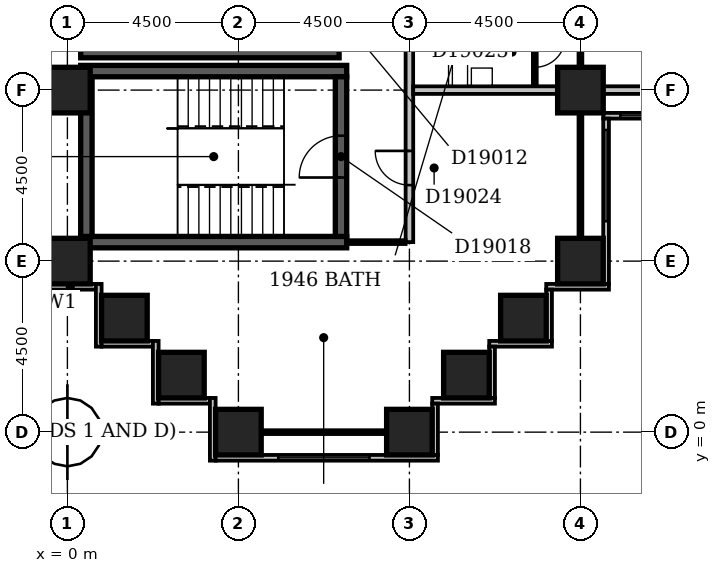
"""IFC4 building model, lengths in metres.
Left out: names, types, materials, properties, quantities, classifications, styles, units other than length and angle.
Written with IfcOpenShell. Run it as: python <this file> out.ifc"""

import sys

from ifc_helpers import new_model, si_unit, direction, frame, frame_2d, origin, origin_2d, place, context, subcontext, project, spatial, rectangle, extrude, element, fill, save


model = new_model("IFC4")
c1 = context("Model", 3, precision=1e-05, world=origin(), true_north=direction((0.0, 1.0)))
c2 = subcontext(c1, "Body", "Model", "MODEL_VIEW")
j1 = project(units=[si_unit("LENGTHUNIT", "METRE"), si_unit("PLANEANGLEUNIT", "RADIAN")], contexts=[c1])
p1 = place(None, origin())
s1 = spatial("IfcSite", under=j1, at=p1, CompositionType="ELEMENT")
p2 = place(p1, origin())
s2 = spatial("IfcBuilding", under=s1, at=p2, CompositionType="ELEMENT")
p3 = place(p2, frame((0.0, 0.0, 79.4)))
s3 = spatial("IfcBuildingStorey", under=s2, at=p3, CompositionType="ELEMENT", Elevation=79.4)
for number, where, z_axis, x_axis in (
    (1, (0.35, 5.0, -0.3), (0.0, 0.0, 1.0), (1.0, 0.0, 0.0)),
    (2, (0.35, 9.5, -0.3), (0.0, 0.0, 1.0), (1.0, 0.0, 0.0)),
):
    element("IfcWall", number, at=place(p3, frame(where, z_axis=z_axis, x_axis=x_axis)), inside=s3, PredefinedType="SHEAR", context=c2, shape_type="SweptSolid", body=[
        extrude(rectangle(XDim=7.0, YDim=0.3, at=frame_2d((3.5, 0.0))), origin(), (0.0, 0.0, 1.0), 3.6),
    ])
p4 = place(p3, frame((0.35, 10.0, -0.3), z_axis=(0.0, 0.0, 1.0), x_axis=(1.0, 0.0, 0.0)))
e3 = element("IfcWall", 3, at=p4, inside=s3, PredefinedType="SHEAR", context=c2, shape_type="SweptSolid", body=[
    extrude(rectangle(XDim=6.8, YDim=0.3, at=frame_2d((3.4, 0.0))), origin(), (0.0, 0.0, 1.0), 3.6),
])
p5 = place(p3, frame((0.5, 5.15, -0.3), z_axis=(0.0, 0.0, 1.0), x_axis=(0.0, 1.0, 0.0)))
e4 = element("IfcWall", 4, at=p5, inside=s3, PredefinedType="SHEAR", context=c2, shape_type="SweptSolid", body=[
    extrude(rectangle(XDim=4.2, YDim=0.3, at=frame_2d((2.1, 0.0))), origin(), (0.0, 0.0, 1.0), 3.6),
])
p6 = place(p3, frame((7.2, 5.15, -0.3), z_axis=(0.0, 0.0, 1.0), x_axis=(0.0, 1.0, 0.0)))
e5 = element("IfcWall", 5, at=p6, inside=s3, PredefinedType="SHEAR", context=c2, shape_type="SweptSolid", body=[
    extrude(rectangle(XDim=4.2, YDim=0.3, at=frame_2d((2.1, 0.0))), origin(), (0.0, 0.0, 1.0), 3.6),
])
p7 = place(p6, frame((1.55, 0.0, 0.3)))
e6 = element("IfcOpeningElement", 6, at=p7, cuts=e5, PredefinedType="OPENING", context=c2, shape_type="SweptSolid", body=[
    extrude(rectangle(XDim=1.1, YDim=2.1, at=frame_2d((0.55, 1.05))), frame((0.0, 0.162, 0.0), z_axis=(0.0, -1.0, 0.0), x_axis=(1.0, 0.0, 0.0)), (0.0, 0.0, 1.0), 0.324),
])
for number, where, z_axis, x_axis in (
    (7, (4.5, 0.0, -0.3), (0.0, 0.0, 1.0), (1.0, 0.0, 0.0)),
    (8, (9.0, 0.0, -0.3), (0.0, 0.0, 1.0), (1.0, 0.0, 0.0)),
    (9, (3.0, 1.5, -0.3), (0.0, 0.0, 1.0), (1.0, 0.0, 0.0)),
    (10, (10.5, 1.5, -0.3), (0.0, 0.0, 1.0), (1.0, 0.0, 0.0)),
    (11, (1.5, 3.0, -0.3), (0.0, 0.0, 1.0), (1.0, 0.0, 0.0)),
    (12, (12.0, 3.0, -0.3), (0.0, 0.0, 1.0), (1.0, 0.0, 0.0)),
    (13, (0.0, 4.5, -0.3), (0.0, 0.0, 1.0), (1.0, 0.0, 0.0)),
    (14, (13.5, 4.5, -0.3), (0.0, 0.0, 1.0), (1.0, 0.0, 0.0)),
    (15, (0.0, 9.0, -0.3), (0.0, 0.0, 1.0), (1.0, 0.0, 0.0)),
    (16, (13.5, 9.0, -0.3), (0.0, 0.0, 1.0), (1.0, 0.0, 0.0)),
):
    element("IfcColumn", number, at=place(p3, frame(where, z_axis=z_axis, x_axis=x_axis)), inside=s3, PredefinedType="COLUMN", context=c2, shape_type="SweptSolid", body=[
        extrude(rectangle(XDim=1.2, YDim=1.2, at=origin_2d()), origin(), (0.0, 0.0, 1.0), 3.6),
    ])
p8 = place(p3, frame((9.675, -0.6, 0.0), z_axis=(0.0, 0.0, 1.0), x_axis=(0.0, 1.0, 0.0)))
e17 = element("IfcWall", 17, at=p8, inside=s3, PredefinedType="STANDARD", context=c2, shape_type="SweptSolid", body=[
    extrude(rectangle(XDim=1.35, YDim=0.15, at=frame_2d((0.675, 0.0))), origin(), (0.0, 0.0, 1.0), 2.7),
])
p9 = place(p3, frame((9.6, 0.825, 0.0), z_axis=(0.0, 0.0, 1.0), x_axis=(1.0, 0.0, 0.0)))
e18 = element("IfcWall", 18, at=p9, inside=s3, PredefinedType="STANDARD", context=c2, shape_type="SweptSolid", body=[
    extrude(rectangle(XDim=1.65, YDim=0.15, at=frame_2d((0.825, 0.0))), origin(), (0.0, 0.0, 1.0), 2.7),
])
p10 = place(p3, frame((11.175, 0.9, 0.0), z_axis=(0.0, 0.0, 1.0), x_axis=(0.0, 1.0, 0.0)))
e19 = element("IfcWall", 19, at=p10, inside=s3, PredefinedType="STANDARD", context=c2, shape_type="SweptSolid", body=[
    extrude(rectangle(XDim=1.35, YDim=0.15, at=frame_2d((0.675, 0.0))), origin(), (0.0, 0.0, 1.0), 2.7),
])
p11 = place(p3, frame((11.1, 2.325, 0.0), z_axis=(0.0, 0.0, 1.0), x_axis=(1.0, 0.0, 0.0)))
e20 = element("IfcWall", 20, at=p11, inside=s3, PredefinedType="STANDARD", context=c2, shape_type="SweptSolid", body=[
    extrude(rectangle(XDim=1.65, YDim=0.15, at=frame_2d((0.825, 0.0))), origin(), (0.0, 0.0, 1.0), 2.7),
])
p12 = place(p3, frame((12.675, 2.4, 0.0), z_axis=(0.0, 0.0, 1.0), x_axis=(0.0, 1.0, 0.0)))
e21 = element("IfcWall", 21, at=p12, inside=s3, PredefinedType="STANDARD", context=c2, shape_type="SweptSolid", body=[
    extrude(rectangle(XDim=1.35, YDim=0.15, at=frame_2d((0.675, 0.0))), origin(), (0.0, 0.0, 1.0), 2.7),
])
p13 = place(p3, frame((12.6, 3.825, 0.0), z_axis=(0.0, 0.0, 1.0), x_axis=(1.0, 0.0, 0.0)))
e22 = element("IfcWall", 22, at=p13, inside=s3, PredefinedType="STANDARD", context=c2, shape_type="SweptSolid", body=[
    extrude(rectangle(XDim=1.65, YDim=0.15, at=frame_2d((0.825, 0.0))), origin(), (0.0, 0.0, 1.0), 2.7),
])
p14 = place(p3, frame((14.175, 3.9, 0.0), z_axis=(0.0, 0.0, 1.0), x_axis=(0.0, 1.0, 0.0)))
e23 = element("IfcWall", 23, at=p14, inside=s3, PredefinedType="STANDARD", context=c2, shape_type="SweptSolid", body=[
    extrude(rectangle(XDim=4.35, YDim=0.15, at=frame_2d((2.175, 0.0))), origin(), (0.0, 0.0, 1.0), 2.7),
])
p15 = place(p14, frame((1.65, 0.0, 0.6)))
e24 = element("IfcOpeningElement", 24, at=p15, cuts=e23, PredefinedType="OPENING", context=c2, shape_type="SweptSolid", body=[
    extrude(rectangle(XDim=2.4, YDim=1.8, at=frame_2d((1.2, 0.9))), frame((0.0, 0.087, 0.0), z_axis=(0.0, -1.0, 0.0), x_axis=(1.0, 0.0, 0.0)), (0.0, 0.0, 1.0), 0.174),
])
p16 = place(p3, frame((14.1, 8.325, 0.0), z_axis=(0.0, 0.0, 1.0), x_axis=(1.0, 0.0, 0.0)))
e25 = element("IfcWall", 25, at=p16, inside=s3, PredefinedType="STANDARD", context=c2, shape_type="SweptSolid", body=[
    extrude(rectangle(XDim=4.65, YDim=0.15, at=frame_2d((2.325, 0.0))), origin(), (0.0, 0.0, 1.0), 2.7),
])
p17 = place(p16, frame((0.45, 0.0, 0.6)))
e26 = element("IfcOpeningElement", 26, at=p17, cuts=e25, PredefinedType="OPENING", context=c2, shape_type="SweptSolid", body=[
    extrude(rectangle(XDim=2.4, YDim=1.8, at=frame_2d((1.2, 0.9))), frame((0.0, 0.087, 0.0), z_axis=(0.0, -1.0, 0.0), x_axis=(1.0, 0.0, 0.0)), (0.0, 0.0, 1.0), 0.174),
])
p18 = place(p3, frame((-0.6, 3.825, 0.0), z_axis=(0.0, 0.0, 1.0), x_axis=(1.0, 0.0, 0.0)))
e27 = element("IfcWall", 27, at=p18, inside=s3, PredefinedType="STANDARD", context=c2, shape_type="SweptSolid", body=[
    extrude(rectangle(XDim=1.35, YDim=0.15, at=frame_2d((0.675, 0.0))), origin(), (0.0, 0.0, 1.0), 2.7),
])
p19 = place(p3, frame((0.825, 3.9, 0.0), z_axis=(0.0, 0.0, 1.0), x_axis=(0.0, -1.0, 0.0)))
e28 = element("IfcWall", 28, at=p19, inside=s3, PredefinedType="STANDARD", context=c2, shape_type="SweptSolid", body=[
    extrude(rectangle(XDim=1.65, YDim=0.15, at=frame_2d((0.825, 0.0))), origin(), (0.0, 0.0, 1.0), 2.7),
])
p20 = place(p3, frame((0.9, 2.325, 0.0), z_axis=(0.0, 0.0, 1.0), x_axis=(1.0, 0.0, 0.0)))
e29 = element("IfcWall", 29, at=p20, inside=s3, PredefinedType="STANDARD", context=c2, shape_type="SweptSolid", body=[
    extrude(rectangle(XDim=1.35, YDim=0.15, at=frame_2d((0.675, 0.0))), origin(), (0.0, 0.0, 1.0), 2.7),
])
p21 = place(p3, frame((2.325, 2.4, 0.0), z_axis=(0.0, 0.0, 1.0), x_axis=(0.0, -1.0, 0.0)))
e30 = element("IfcWall", 30, at=p21, inside=s3, PredefinedType="STANDARD", context=c2, shape_type="SweptSolid", body=[
    extrude(rectangle(XDim=1.65, YDim=0.15, at=frame_2d((0.825, 0.0))), origin(), (0.0, 0.0, 1.0), 2.7),
])
p22 = place(p3, frame((2.4, 0.825, 0.0), z_axis=(0.0, 0.0, 1.0), x_axis=(1.0, 0.0, 0.0)))
e31 = element("IfcWall", 31, at=p22, inside=s3, PredefinedType="STANDARD", context=c2, shape_type="SweptSolid", body=[
    extrude(rectangle(XDim=1.35, YDim=0.15, at=frame_2d((0.675, 0.0))), origin(), (0.0, 0.0, 1.0), 2.7),
])
p23 = place(p3, frame((3.825, 0.9, 0.0), z_axis=(0.0, 0.0, 1.0), x_axis=(0.0, -1.0, 0.0)))
e32 = element("IfcWall", 32, at=p23, inside=s3, PredefinedType="STANDARD", context=c2, shape_type="SweptSolid", body=[
    extrude(rectangle(XDim=1.65, YDim=0.15, at=frame_2d((0.825, 0.0))), origin(), (0.0, 0.0, 1.0), 2.7),
])
p24 = place(p3, frame((3.9, -0.675, 0.0), z_axis=(0.0, 0.0, 1.0), x_axis=(1.0, 0.0, 0.0)))
e33 = element("IfcWall", 33, at=p24, inside=s3, PredefinedType="STANDARD", context=c2, shape_type="SweptSolid", body=[
    extrude(rectangle(XDim=5.85, YDim=0.15, at=frame_2d((2.925, 0.0))), origin(), (0.0, 0.0, 1.0), 2.7),
])
p25 = place(p24, frame((1.65, 0.0, 0.6)))
e34 = element("IfcOpeningElement", 34, at=p25, cuts=e33, PredefinedType="OPENING", context=c2, shape_type="SweptSolid", body=[
    extrude(rectangle(XDim=2.4, YDim=1.8, at=frame_2d((1.2, 0.9))), frame((0.0, 0.087, 0.0), z_axis=(0.0, -1.0, 0.0), x_axis=(1.0, 0.0, 0.0)), (0.0, 0.0, 1.0), 0.174),
])
p26 = place(p3, frame((5.1, 0.0, 0.0), z_axis=(0.0, 0.0, 1.0), x_axis=(1.0, 0.0, 0.0)))
e35 = element("IfcWall", 35, at=p26, inside=s3, PredefinedType="PARTITIONING", context=c2, shape_type="SweptSolid", body=[
    extrude(rectangle(XDim=3.3, YDim=0.1, at=frame_2d((1.65, 0.0))), origin(), (0.0, 0.0, 1.0), 2.7),
])
p27 = place(p3, frame((0.0, 4.4, 0.0), z_axis=(0.0, 0.0, 1.0), x_axis=(0.0, 1.0, 0.0)))
e36 = element("IfcWall", 36, at=p27, inside=s3, PredefinedType="PARTITIONING", context=c2, shape_type="SweptSolid", body=[
    extrude(rectangle(XDim=0.7, YDim=0.1, at=frame_2d((0.35, 0.0))), origin(), (0.0, 0.0, 1.0), 2.7),
])
p28 = place(p3, frame((7.349, 5.0, 0.0), z_axis=(0.0, 0.0, 1.0), x_axis=(1.0, 0.0, 0.0)))
e37 = element("IfcWall", 37, at=p28, inside=s3, PredefinedType="PARTITIONING", context=c2, shape_type="SweptSolid", body=[
    extrude(rectangle(XDim=1.551, YDim=0.1, at=frame_2d((0.775, 0.0))), origin(), (0.0, 0.0, 1.0), 3.3),
])
p29 = place(p3, frame((9.0, 5.0, 0.0), z_axis=(0.0, 0.0, 1.0), x_axis=(0.0, 1.0, 0.0)))
e38 = element("IfcWall", 38, at=p29, inside=s3, PredefinedType="PARTITIONING", context=c2, shape_type="SweptSolid", body=[
    extrude(rectangle(XDim=44.5, YDim=0.2, at=frame_2d((22.25, 0.0))), origin(), (0.0, 0.0, 1.0), 3.3),
])
p30 = place(p29, frame((17.8, 0.0, 0.0)))
e39 = element("IfcOpeningElement", 39, at=p30, cuts=e38, PredefinedType="OPENING", context=c2, shape_type="SweptSolid", body=[
    extrude(rectangle(XDim=1.0, YDim=2.1, at=frame_2d((0.5, 1.05))), frame((0.0, 0.112, 0.0), z_axis=(0.0, -1.0, 0.0), x_axis=(1.0, 0.0, 0.0)), (0.0, 0.0, 1.0), 0.224),
])
p31 = place(p29, frame((14.95, 0.0, 0.0)))
e40 = element("IfcOpeningElement", 40, at=p31, cuts=e38, PredefinedType="OPENING", context=c2, shape_type="SweptSolid", body=[
    extrude(rectangle(XDim=1.0, YDim=2.1, at=frame_2d((0.5, 1.05))), frame((0.0, 0.112, 0.0), z_axis=(0.0, -1.0, 0.0), x_axis=(1.0, 0.0, 0.0)), (0.0, 0.0, 1.0), 0.224),
])
p32 = place(p29, frame((10.45, 0.0, 0.0)))
e41 = element("IfcOpeningElement", 41, at=p32, cuts=e38, PredefinedType="OPENING", context=c2, shape_type="SweptSolid", body=[
    extrude(rectangle(XDim=1.0, YDim=2.1, at=frame_2d((0.5, 1.05))), frame((0.0, 0.112, 0.0), z_axis=(0.0, -1.0, 0.0), x_axis=(1.0, 0.0, 0.0)), (0.0, 0.0, 1.0), 0.224),
])
p33 = place(p29, frame((5.95, 0.0, 0.0)))
e42 = element("IfcOpeningElement", 42, at=p33, cuts=e38, PredefinedType="OPENING", context=c2, shape_type="SweptSolid", body=[
    extrude(rectangle(XDim=1.0, YDim=2.1, at=frame_2d((0.5, 1.05))), frame((0.0, 0.112, 0.0), z_axis=(0.0, -1.0, 0.0), x_axis=(1.0, 0.0, 0.0)), (0.0, 0.0, 1.0), 0.224),
])
p34 = place(p29, frame((35.0, 0.0, 0.0)))
e43 = element("IfcOpeningElement", 43, at=p34, cuts=e38, PredefinedType="OPENING", context=c2, shape_type="SweptSolid", body=[
    extrude(rectangle(XDim=0.9, YDim=2.1, at=frame_2d((0.45, 1.05))), frame((0.0, 0.112, 0.0), z_axis=(0.0, -1.0, 0.0), x_axis=(1.0, 0.0, 0.0)), (0.0, 0.0, 1.0), 0.224),
])
p35 = place(p29, frame((1.5, 0.0, 0.0)))
e44 = element("IfcOpeningElement", 44, at=p35, cuts=e38, PredefinedType="OPENING", context=c2, shape_type="SweptSolid", body=[
    extrude(rectangle(XDim=0.9, YDim=2.1, at=frame_2d((0.45, 1.05))), frame((0.0, 0.112, 0.0), z_axis=(0.0, -1.0, 0.0), x_axis=(1.0, 0.0, 0.0)), (0.0, 0.0, 1.0), 0.224),
])
p36 = place(p3, frame((13.5, 5.1, 0.0), z_axis=(0.0, 0.0, 1.0), x_axis=(0.0, 1.0, 0.0)))
e45 = element("IfcWall", 45, at=p36, inside=s3, PredefinedType="PARTITIONING", context=c2, shape_type="SweptSolid", body=[
    extrude(rectangle(XDim=3.3, YDim=0.1, at=frame_2d((1.65, 0.0))), origin(), (0.0, 0.0, 1.0), 2.7),
])
p37 = place(p3, frame((9.1, 9.0, 0.0), z_axis=(0.0, 0.0, 1.0), x_axis=(1.0, 0.0, 0.0)))
e46 = element("IfcWall", 46, at=p37, inside=s3, PredefinedType="PARTITIONING", context=c2, shape_type="SweptSolid", body=[
    extrude(rectangle(XDim=3.8, YDim=0.2, at=frame_2d((1.9, 0.0))), origin(), (0.0, 0.0, 1.0), 3.3),
])
p38 = place(p3, frame((14.1, 9.0, 0.0), z_axis=(0.0, 0.0, 1.0), x_axis=(1.0, 0.0, 0.0)))
e47 = element("IfcWall", 47, at=p38, inside=s3, PredefinedType="PARTITIONING", context=c2, shape_type="SweptSolid", body=[
    extrude(rectangle(XDim=3.3, YDim=0.2, at=frame_2d((1.65, 0.0))), origin(), (0.0, 0.0, 1.0), 2.7),
])
p39 = place(p3, frame((12.3, 9.1, 0.0), z_axis=(0.0, 0.0, 1.0), x_axis=(0.0, 1.0, 0.0)))
e48 = element("IfcWall", 48, at=p39, inside=s3, PredefinedType="PARTITIONING", context=c2, shape_type="SweptSolid", body=[
    extrude(rectangle(XDim=1.6, YDim=0.1, at=frame_2d((0.8, 0.0))), origin(), (0.0, 0.0, 1.0), 3.3),
])
p40 = place(p39, frame((0.5, 0.0, 0.0)))
e49 = element("IfcOpeningElement", 49, at=p40, cuts=e48, PredefinedType="OPENING", context=c2, shape_type="SweptSolid", body=[
    extrude(rectangle(XDim=0.8, YDim=2.1, at=frame_2d((0.4, 1.05))), frame((0.0, 0.062, 0.0), z_axis=(0.0, -1.0, 0.0), x_axis=(1.0, 0.0, 0.0)), (0.0, 0.0, 1.0), 0.124),
])
p41 = place(p3, frame((13.5, 9.6, 0.0), z_axis=(0.0, 0.0, 1.0), x_axis=(0.0, 1.0, 0.0)))
e50 = element("IfcWall", 50, at=p41, inside=s3, PredefinedType="PARTITIONING", context=c2, shape_type="SweptSolid", body=[
    extrude(rectangle(XDim=8.3, YDim=0.1, at=frame_2d((4.15, 0.0))), origin(), (0.0, 0.0, 1.0), 3.3),
])
p42 = place(p41, frame((5.7, 0.0, 0.0)))
e51 = element("IfcOpeningElement", 51, at=p42, cuts=e50, PredefinedType="OPENING", context=c2, shape_type="SweptSolid", body=[
    extrude(rectangle(XDim=0.9, YDim=2.1, at=frame_2d((0.45, 1.05))), frame((0.0, 0.062, 0.0), z_axis=(0.0, -1.0, 0.0), x_axis=(1.0, 0.0, 0.0)), (0.0, 0.0, 1.0), 0.124),
])
p43 = place(p41, frame((1.2, 0.0, 0.0)))
e52 = element("IfcOpeningElement", 52, at=p43, cuts=e50, PredefinedType="OPENING", context=c2, shape_type="SweptSolid", body=[
    extrude(rectangle(XDim=0.9, YDim=2.1, at=frame_2d((0.45, 1.05))), frame((0.0, 0.062, 0.0), z_axis=(0.0, -1.0, 0.0), x_axis=(1.0, 0.0, 0.0)), (0.0, 0.0, 1.0), 0.124),
])
p44 = place(p15, origin())
e53 = element("IfcWindow", 53, at=p44, inside=s3, PartitioningType="SINGLE_PANEL", PredefinedType="WINDOW", context=c2, shape_type="SweptSolid", body=[
    extrude(rectangle(XDim=2.4, YDim=1.8, at=frame_2d((1.2, 0.9))), frame((0.0, 0.03, 0.0), z_axis=(0.0, -1.0, 0.0), x_axis=(1.0, 0.0, 0.0)), (0.0, 0.0, 1.0), 0.06),
])
fill(e24, e53)
p45 = place(p17, origin())
e54 = element("IfcWindow", 54, at=p45, inside=s3, PartitioningType="SINGLE_PANEL", PredefinedType="WINDOW", context=c2, shape_type="SweptSolid", body=[
    extrude(rectangle(XDim=2.4, YDim=1.8, at=frame_2d((1.2, 0.9))), frame((0.0, 0.03, 0.0), z_axis=(0.0, -1.0, 0.0), x_axis=(1.0, 0.0, 0.0)), (0.0, 0.0, 1.0), 0.06),
])
fill(e26, e54)
p46 = place(p25, origin())
e55 = element("IfcWindow", 55, at=p46, inside=s3, PartitioningType="SINGLE_PANEL", PredefinedType="WINDOW", context=c2, shape_type="SweptSolid", body=[
    extrude(rectangle(XDim=2.4, YDim=1.8, at=frame_2d((1.2, 0.9))), frame((0.0, 0.03, 0.0), z_axis=(0.0, -1.0, 0.0), x_axis=(1.0, 0.0, 0.0)), (0.0, 0.0, 1.0), 0.06),
])
fill(e34, e55)
p47 = place(p7, origin())
e56 = element("IfcDoor", 56, at=p47, inside=s3, OperationType="SINGLE_SWING_LEFT", PredefinedType="DOOR", context=c2, shape_type="SweptSolid", body=[
    extrude(rectangle(XDim=1.1, YDim=2.1, at=frame_2d((0.55, 1.05))), frame((0.0, 0.025, 0.0), z_axis=(0.0, -1.0, 0.0), x_axis=(1.0, 0.0, 0.0)), (0.0, 0.0, 1.0), 0.05),
])
fill(e6, e56)
p48 = place(p35, frame((0.9, 0.0, 0.0), z_axis=(0.0, 0.0, 1.0), x_axis=(-1.0, 0.0, 0.0)))
e57 = element("IfcDoor", 57, at=p48, inside=s3, OperationType="SINGLE_SWING_LEFT", PredefinedType="DOOR", context=c2, shape_type="SweptSolid", body=[
    extrude(rectangle(XDim=0.9, YDim=2.1, at=frame_2d((0.45, 1.05))), frame((0.0, 0.025, 0.0), z_axis=(0.0, -1.0, 0.0), x_axis=(1.0, 0.0, 0.0)), (0.0, 0.0, 1.0), 0.05),
])
fill(e44, e57)
p49 = place(p40, origin())
e58 = element("IfcDoor", 58, at=p49, inside=s3, OperationType="SINGLE_SWING_RIGHT", PredefinedType="DOOR", context=c2, shape_type="SweptSolid", body=[
    extrude(rectangle(XDim=0.8, YDim=2.1, at=frame_2d((0.4, 1.05))), frame((0.0, 0.025, 0.0), z_axis=(0.0, -1.0, 0.0), x_axis=(1.0, 0.0, 0.0)), (0.0, 0.0, 1.0), 0.05),
])
fill(e49, e58)
save(model, sys.argv[1])
